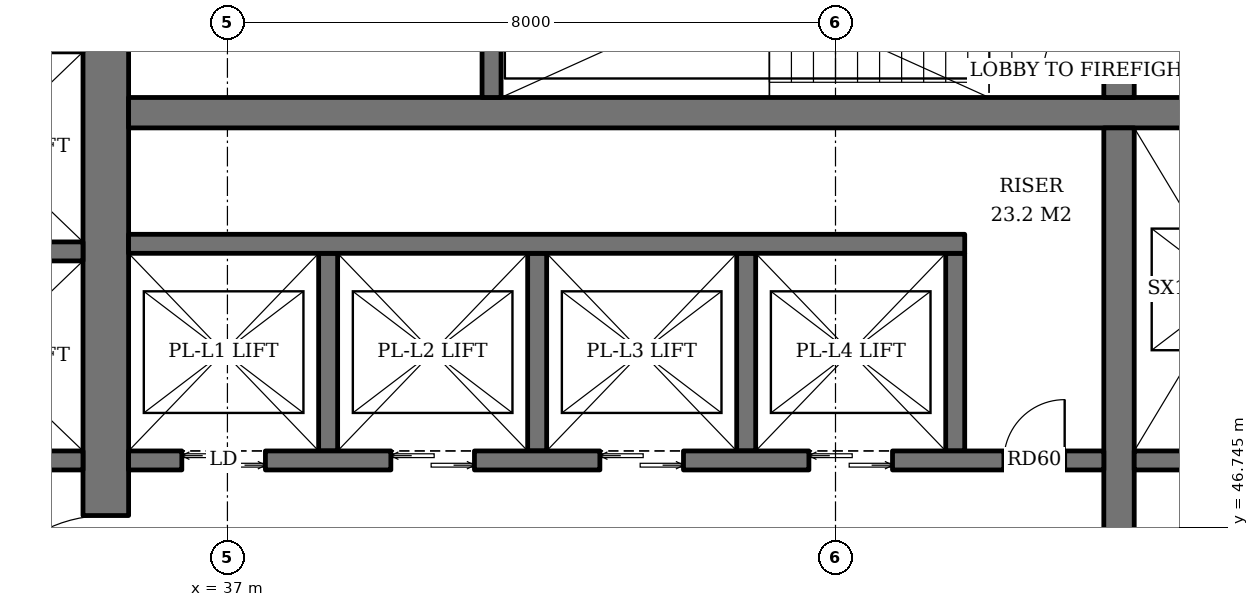
"""IFC4 building model, lengths in metres.
Left out: names, types, materials, properties, quantities, classifications, styles, units other than length and angle.
Written with IfcOpenShell. Run it as: python <this file> out.ifc"""

import sys

from ifc_helpers import new_model, si_unit, direction, frame, frame_2d, origin, place, context, subcontext, project, spatial, rectangle, extrude, element, fill, save


model = new_model("IFC4")
c1 = context("Model", 3, precision=1e-05, world=origin(), true_north=direction((0.0, 1.0)))
c2 = subcontext(c1, "Body", "Model", "MODEL_VIEW")
j1 = project(units=[si_unit("LENGTHUNIT", "METRE"), si_unit("PLANEANGLEUNIT", "RADIAN")], contexts=[c1])
p1 = place(None, origin())
s1 = spatial("IfcSite", under=j1, at=p1, CompositionType="ELEMENT")
p2 = place(p1, origin())
s2 = spatial("IfcBuilding", under=s1, at=p2, CompositionType="ELEMENT")
p3 = place(p2, frame((0.0, 0.0, 70.4)))
s3 = spatial("IfcBuildingStorey", under=s2, at=p3, CompositionType="ELEMENT", Elevation=70.4)
p4 = place(p3, frame((35.4, 36.7, 0.0), z_axis=(0.0, 0.0, 1.0), x_axis=(0.0, 1.0, 0.0)))
e1 = element("IfcWall", 1, at=p4, inside=s3, PredefinedType="SHEAR", context=c2, shape_type="SweptSolid", body=[
    extrude(rectangle(XDim=18.6, YDim=0.6, at=frame_2d((9.3, 0.0))), origin(), (0.0, 0.0, 1.0), 3.8),
])
p5 = place(p4, frame((8.4, 0.0, 0.0)))
e2 = element("IfcOpeningElement", 2, at=p5, cuts=e1, PredefinedType="OPENING", context=c2, shape_type="SweptSolid", body=[
    extrude(rectangle(XDim=1.8, YDim=2.4, at=frame_2d((0.9, 1.2))), frame((0.0, 0.31, 0.0), z_axis=(0.0, -1.0, 0.0), x_axis=(1.0, 0.0, 0.0)), (0.0, 0.0, 1.0), 0.62),
])
p6 = place(p3, frame((35.7, 52.2, 0.0), z_axis=(0.0, 0.0, 1.0), x_axis=(1.0, 0.0, 0.0)))
e3 = element("IfcWall", 3, at=p6, inside=s3, PredefinedType="SHEAR", context=c2, shape_type="SweptSolid", body=[
    extrude(rectangle(XDim=18.6, YDim=0.4, at=frame_2d((9.3, 0.0))), origin(), (0.0, 0.0, 1.0), 3.8),
])
p7 = place(p3, frame((48.73, 40.0, 0.0), z_axis=(0.0, 0.0, 1.0), x_axis=(0.0, 1.0, 0.0)))
e4 = element("IfcWall", 4, at=p7, inside=s3, PredefinedType="SHEAR", context=c2, shape_type="SweptSolid", body=[
    extrude(rectangle(XDim=12.0, YDim=0.4, at=frame_2d((6.0, 0.0))), origin(), (0.0, 0.0, 1.0), 3.8),
])
p8 = place(p3, frame((48.73, 52.4, 0.0), z_axis=(0.0, 0.0, 1.0), x_axis=(0.0, 1.0, 0.0)))
e5 = element("IfcWall", 5, at=p8, inside=s3, PredefinedType="SHEAR", context=c2, shape_type="SweptSolid", body=[
    extrude(rectangle(XDim=2.9, YDim=0.4, at=frame_2d((1.45, 0.0))), origin(), (0.0, 0.0, 1.0), 3.8),
])
p9 = place(p8, frame((0.3, 0.0, 0.0)))
e6 = element("IfcOpeningElement", 6, at=p9, cuts=e5, PredefinedType="OPENING", context=c2, shape_type="SweptSolid", body=[
    extrude(rectangle(XDim=1.0, YDim=2.1, at=frame_2d((0.5, 1.05))), frame((0.0, 0.21, 0.0), z_axis=(0.0, -1.0, 0.0), x_axis=(1.0, 0.0, 0.0)), (0.0, 0.0, 1.0), 0.42),
])
p10 = place(p3, frame((40.475, 52.4, 0.0), z_axis=(0.0, 0.0, 1.0), x_axis=(0.0, 1.0, 0.0)))
e7 = element("IfcWall", 7, at=p10, inside=s3, PredefinedType="SHEAR", context=c2, shape_type="SweptSolid", body=[
    extrude(rectangle(XDim=2.9, YDim=0.25, at=frame_2d((1.45, 0.0))), origin(), (0.0, 0.0, 1.0), 3.8),
])
for number, where, z_axis, x_axis in (
    (8, (38.325, 47.75, 0.0), (0.0, 0.0, 1.0), (0.0, 1.0, 0.0)),
    (9, (41.075, 47.75, 0.0), (0.0, 0.0, 1.0), (0.0, 1.0, 0.0)),
    (10, (43.825, 47.75, 0.0), (0.0, 0.0, 1.0), (0.0, 1.0, 0.0)),
    (11, (46.575, 47.75, 0.0), (0.0, 0.0, 1.0), (0.0, 1.0, 0.0)),
):
    element("IfcWall", number, at=place(p3, frame(where, z_axis=z_axis, x_axis=x_axis)), inside=s3, PredefinedType="SHEAR", context=c2, shape_type="SweptSolid", body=[
        extrude(rectangle(XDim=2.6, YDim=0.25, at=frame_2d((1.3, 0.0))), origin(), (0.0, 0.0, 1.0), 3.8),
    ])
p11 = place(p3, frame((35.7, 50.475, 0.0), z_axis=(0.0, 0.0, 1.0), x_axis=(1.0, 0.0, 0.0)))
e12 = element("IfcWall", 12, at=p11, inside=s3, PredefinedType="SHEAR", context=c2, shape_type="SweptSolid", body=[
    extrude(rectangle(XDim=11.0, YDim=0.25, at=frame_2d((5.5, 0.0))), origin(), (0.0, 0.0, 1.0), 3.8),
])
p12 = place(p3, frame((35.7, 47.625, 0.0), z_axis=(0.0, 0.0, 1.0), x_axis=(1.0, 0.0, 0.0)))
e13 = element("IfcWall", 13, at=p12, inside=s3, PredefinedType="SHEAR", context=c2, shape_type="SweptSolid", body=[
    extrude(rectangle(XDim=12.83, YDim=0.25, at=frame_2d((6.415, 0.0))), origin(), (0.0, 0.0, 1.0), 3.8),
])
p13 = place(p12, frame((0.7, 0.0, 0.0)))
e14 = element("IfcOpeningElement", 14, at=p13, cuts=e13, PredefinedType="OPENING", context=c2, shape_type="SweptSolid", body=[
    extrude(rectangle(XDim=1.1, YDim=2.2, at=frame_2d((0.55, 1.1))), frame((0.0, 0.135, 0.0), z_axis=(0.0, -1.0, 0.0), x_axis=(1.0, 0.0, 0.0)), (0.0, 0.0, 1.0), 0.27),
])
p14 = place(p12, frame((3.45, 0.0, 0.0)))
e15 = element("IfcOpeningElement", 15, at=p14, cuts=e13, PredefinedType="OPENING", context=c2, shape_type="SweptSolid", body=[
    extrude(rectangle(XDim=1.1, YDim=2.2, at=frame_2d((0.55, 1.1))), frame((0.0, 0.135, 0.0), z_axis=(0.0, -1.0, 0.0), x_axis=(1.0, 0.0, 0.0)), (0.0, 0.0, 1.0), 0.27),
])
p15 = place(p12, frame((6.2, 0.0, 0.0)))
e16 = element("IfcOpeningElement", 16, at=p15, cuts=e13, PredefinedType="OPENING", context=c2, shape_type="SweptSolid", body=[
    extrude(rectangle(XDim=1.1, YDim=2.2, at=frame_2d((0.55, 1.1))), frame((0.0, 0.135, 0.0), z_axis=(0.0, -1.0, 0.0), x_axis=(1.0, 0.0, 0.0)), (0.0, 0.0, 1.0), 0.27),
])
p16 = place(p12, frame((8.95, 0.0, 0.0)))
e17 = element("IfcOpeningElement", 17, at=p16, cuts=e13, PredefinedType="OPENING", context=c2, shape_type="SweptSolid", body=[
    extrude(rectangle(XDim=1.1, YDim=2.2, at=frame_2d((0.55, 1.1))), frame((0.0, 0.135, 0.0), z_axis=(0.0, -1.0, 0.0), x_axis=(1.0, 0.0, 0.0)), (0.0, 0.0, 1.0), 0.27),
])
p17 = place(p12, frame((11.515, 0.0, 0.0)))
e18 = element("IfcOpeningElement", 18, at=p17, cuts=e13, PredefinedType="OPENING", context=c2, shape_type="SweptSolid", body=[
    extrude(rectangle(XDim=0.8, YDim=2.0, at=frame_2d((0.4, 1.0))), frame((0.0, 0.135, 0.0), z_axis=(0.0, -1.0, 0.0), x_axis=(1.0, 0.0, 0.0)), (0.0, 0.0, 1.0), 0.27),
])
p18 = place(p3, frame((48.93, 47.625, 0.0), z_axis=(0.0, 0.0, 1.0), x_axis=(1.0, 0.0, 0.0)))
e19 = element("IfcWall", 19, at=p18, inside=s3, PredefinedType="SHEAR", context=c2, shape_type="SweptSolid", body=[
    extrude(rectangle(XDim=5.37, YDim=0.25, at=frame_2d((2.685, 0.0))), origin(), (0.0, 0.0, 1.0), 3.8),
])
for number, where, z_axis, x_axis in (
    (20, (32.5, 47.625, 0.0), (0.0, 0.0, 1.0), (1.0, 0.0, 0.0)),
    (21, (32.5, 50.375, 0.0), (0.0, 0.0, 1.0), (1.0, 0.0, 0.0)),
):
    element("IfcWall", number, at=place(p3, frame(where, z_axis=z_axis, x_axis=x_axis)), inside=s3, PredefinedType="SHEAR", context=c2, shape_type="SweptSolid", body=[
        extrude(rectangle(XDim=2.6, YDim=0.25, at=frame_2d((1.3, 0.0))), origin(), (0.0, 0.0, 1.0), 3.8),
    ])
p19 = place(p13, origin())
e22 = element("IfcDoor", 22, at=p19, inside=s3, OperationType="DOUBLE_DOOR_SLIDING", PredefinedType="DOOR", context=c2, shape_type="SweptSolid", body=[
    extrude(rectangle(XDim=1.1, YDim=2.2, at=frame_2d((0.55, 1.1))), frame((0.0, 0.025, 0.0), z_axis=(0.0, -1.0, 0.0), x_axis=(1.0, 0.0, 0.0)), (0.0, 0.0, 1.0), 0.05),
])
fill(e14, e22)
p20 = place(p14, origin())
e23 = element("IfcDoor", 23, at=p20, inside=s3, OperationType="DOUBLE_DOOR_SLIDING", PredefinedType="DOOR", context=c2, shape_type="SweptSolid", body=[
    extrude(rectangle(XDim=1.1, YDim=2.2, at=frame_2d((0.55, 1.1))), frame((0.0, 0.025, 0.0), z_axis=(0.0, -1.0, 0.0), x_axis=(1.0, 0.0, 0.0)), (0.0, 0.0, 1.0), 0.05),
])
fill(e15, e23)
p21 = place(p15, origin())
e24 = element("IfcDoor", 24, at=p21, inside=s3, OperationType="DOUBLE_DOOR_SLIDING", PredefinedType="DOOR", context=c2, shape_type="SweptSolid", body=[
    extrude(rectangle(XDim=1.1, YDim=2.2, at=frame_2d((0.55, 1.1))), frame((0.0, 0.025, 0.0), z_axis=(0.0, -1.0, 0.0), x_axis=(1.0, 0.0, 0.0)), (0.0, 0.0, 1.0), 0.05),
])
fill(e16, e24)
p22 = place(p16, origin())
e25 = element("IfcDoor", 25, at=p22, inside=s3, OperationType="DOUBLE_DOOR_SLIDING", PredefinedType="DOOR", context=c2, shape_type="SweptSolid", body=[
    extrude(rectangle(XDim=1.1, YDim=2.2, at=frame_2d((0.55, 1.1))), frame((0.0, 0.025, 0.0), z_axis=(0.0, -1.0, 0.0), x_axis=(1.0, 0.0, 0.0)), (0.0, 0.0, 1.0), 0.05),
])
fill(e17, e25)
p23 = place(p17, origin())
e26 = element("IfcDoor", 26, at=p23, inside=s3, OperationType="SINGLE_SWING_RIGHT", PredefinedType="DOOR", context=c2, shape_type="SweptSolid", body=[
    extrude(rectangle(XDim=0.8, YDim=2.0, at=frame_2d((0.4, 1.0))), frame((0.0, 0.025, 0.0), z_axis=(0.0, -1.0, 0.0), x_axis=(1.0, 0.0, 0.0)), (0.0, 0.0, 1.0), 0.05),
])
fill(e18, e26)
p24 = place(p9, origin())
e27 = element("IfcDoor", 27, at=p24, inside=s3, OperationType="SINGLE_SWING_LEFT", PredefinedType="DOOR", context=c2, shape_type="SweptSolid", body=[
    extrude(rectangle(XDim=1.0, YDim=2.1, at=frame_2d((0.5, 1.05))), frame((0.0, 0.025, 0.0), z_axis=(0.0, -1.0, 0.0), x_axis=(1.0, 0.0, 0.0)), (0.0, 0.0, 1.0), 0.05),
])
fill(e6, e27)
p25 = place(p5, origin())
e28 = element("IfcDoor", 28, at=p25, inside=s3, OperationType="DOUBLE_DOOR_SINGLE_SWING", PredefinedType="DOOR", context=c2, shape_type="SweptSolid", body=[
    extrude(rectangle(XDim=1.8, YDim=2.4, at=frame_2d((0.9, 1.2))), frame((0.0, 0.025, 0.0), z_axis=(0.0, -1.0, 0.0), x_axis=(1.0, 0.0, 0.0)), (0.0, 0.0, 1.0), 0.05),
])
fill(e2, e28)
save(model, sys.argv[1])
